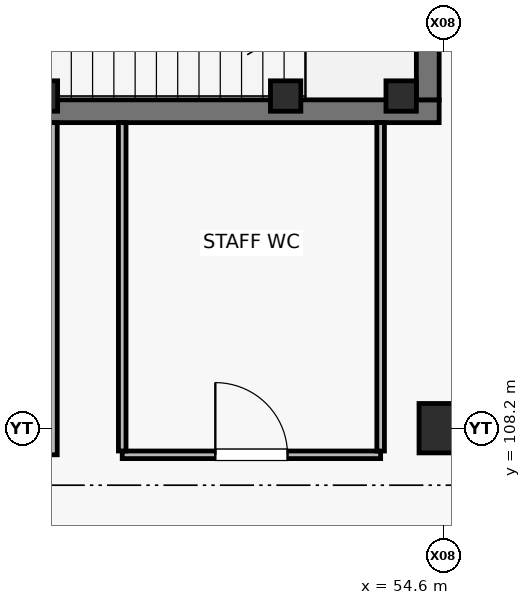
"""IFC4 building model, lengths in metres.
Left out: names, types, materials, properties, quantities, classifications, styles, units other than length and angle.
Written with IfcOpenShell. Run it as: python <this file> out.ifc"""

import sys

from ifc_helpers import new_model, si_unit, direction, frame, frame_2d, origin, origin_2d, place, context, subcontext, project, spatial, rectangle, extrude, element, fill, save


model = new_model("IFC4")
c1 = context("Model", 3, precision=1e-05, world=origin(), true_north=direction((0.0, 1.0)))
c2 = subcontext(c1, "Body", "Model", "MODEL_VIEW")
j1 = project(units=[si_unit("LENGTHUNIT", "METRE"), si_unit("PLANEANGLEUNIT", "RADIAN")], contexts=[c1])
p1 = place(None, origin())
s1 = spatial("IfcSite", under=j1, at=p1, CompositionType="ELEMENT")
p2 = place(p1, origin())
s2 = spatial("IfcBuilding", under=s1, at=p2, CompositionType="ELEMENT")
p3 = place(p2, origin())
s3 = spatial("IfcBuildingStorey", under=s2, at=p3, CompositionType="ELEMENT", Elevation=0.0)
p4 = place(p3, frame((54.6, 108.2, 0.0), z_axis=(0.0, 0.0, 1.0), x_axis=(1.0, 0.0, 0.0)))
e1 = element("IfcColumn", 1, at=p4, inside=s3, PredefinedType="COLUMN", context=c2, shape_type="SweptSolid", body=[
    extrude(rectangle(XDim=0.65, YDim=0.65, at=origin_2d()), origin(), (0.0, 0.0, 1.0), 4.8),
])
for number, where, z_axis, x_axis in (
    (2, (49.32, 112.57, 0.0), (0.0, 0.0, 1.0), (1.0, 0.0, 0.0)),
    (3, (52.52, 112.57, 0.0), (0.0, 0.0, 1.0), (1.0, 0.0, 0.0)),
    (4, (54.04, 112.57, 0.0), (0.0, 0.0, 1.0), (1.0, 0.0, 0.0)),
):
    element("IfcColumn", number, at=place(p3, frame(where, z_axis=z_axis, x_axis=x_axis)), inside=s3, PredefinedType="COLUMN", context=c2, shape_type="SweptSolid", body=[
        extrude(rectangle(XDim=0.4, YDim=0.4, at=origin_2d()), origin(), (0.0, 0.0, 1.0), 4.8),
    ])
p5 = place(p3, frame((46.95, 112.37, 0.0), z_axis=(0.0, 0.0, 1.0), x_axis=(1.0, 0.0, 0.0)))
e5 = element("IfcWall", 5, at=p5, inside=s3, PredefinedType="SHEAR", context=c2, shape_type="SweptSolid", body=[
    extrude(rectangle(XDim=7.59, YDim=0.3, at=frame_2d((3.795, 0.0))), origin(), (0.0, 0.0, 1.0), 4.54),
])
p6 = place(p5, frame((0.59, 0.0, 0.0)))
e6 = element("IfcOpeningElement", 6, at=p6, cuts=e5, PredefinedType="OPENING", context=c2, shape_type="SweptSolid", body=[
    extrude(rectangle(XDim=1.4, YDim=2.2, at=frame_2d((0.7, 1.1))), frame((0.0, 0.16, 0.0), z_axis=(0.0, -1.0, 0.0), x_axis=(1.0, 0.0, 0.0)), (0.0, 0.0, 1.0), 0.32),
])
p7 = place(p3, frame((54.39, 112.52, 0.0), z_axis=(0.0, 0.0, 1.0), x_axis=(0.0, 1.0, 0.0)))
e7 = element("IfcWall", 7, at=p7, inside=s3, PredefinedType="SHEAR", context=c2, shape_type="SweptSolid", body=[
    extrude(rectangle(XDim=3.33, YDim=0.3, at=frame_2d((1.665, 0.0))), origin(), (0.0, 0.0, 1.0), 4.54),
])
p8 = place(p3, frame((49.44, 107.85, 0.0), z_axis=(0.0, 0.0, 1.0), x_axis=(0.0, 1.0, 0.0)))
e8 = element("IfcWall", 8, at=p8, inside=s3, PredefinedType="PARTITIONING", context=c2, shape_type="SweptSolid", body=[
    extrude(rectangle(XDim=4.37, YDim=0.15, at=frame_2d((2.185, 0.0))), origin(), (0.0, 0.0, 1.0), 4.54),
])
p9 = place(p3, frame((50.37, 107.85, 0.0), z_axis=(0.0, 0.0, 1.0), x_axis=(1.0, 0.0, 0.0)))
e9 = element("IfcWall", 9, at=p9, inside=s3, PredefinedType="PARTITIONING", context=c2, shape_type="SweptSolid", body=[
    extrude(rectangle(XDim=3.4, YDim=0.1, at=frame_2d((1.7, 0.0))), origin(), (0.0, 0.0, 1.0), 4.04),
])
p10 = place(p9, frame((1.225, 0.0, 0.0)))
e10 = element("IfcOpeningElement", 10, at=p10, cuts=e9, PredefinedType="OPENING", context=c2, shape_type="SweptSolid", body=[
    extrude(rectangle(XDim=0.95, YDim=2.1, at=frame_2d((0.475, 1.05))), frame((0.0, 0.06, 0.0), z_axis=(0.0, -1.0, 0.0), x_axis=(1.0, 0.0, 0.0)), (0.0, 0.0, 1.0), 0.12),
])
for number, where, z_axis, x_axis in (
    (11, (50.37, 107.9, 0.0), (0.0, 0.0, 1.0), (0.0, 1.0, 0.0)),
    (12, (53.77, 107.9, 0.0), (0.0, 0.0, 1.0), (0.0, 1.0, 0.0)),
):
    element("IfcWall", number, at=place(p3, frame(where, z_axis=z_axis, x_axis=x_axis)), inside=s3, PredefinedType="PARTITIONING", context=c2, shape_type="SweptSolid", body=[
        extrude(rectangle(XDim=4.32, YDim=0.1, at=frame_2d((2.16, 0.0))), origin(), (0.0, 0.0, 1.0), 4.54),
    ])
p11 = place(p10, origin())
e13 = element("IfcDoor", 13, at=p11, inside=s3, OperationType="SINGLE_SWING_LEFT", PredefinedType="DOOR", context=c2, shape_type="SweptSolid", body=[
    extrude(rectangle(XDim=0.95, YDim=2.1, at=frame_2d((0.475, 1.05))), frame((0.0, 0.025, 0.0), z_axis=(0.0, -1.0, 0.0), x_axis=(1.0, 0.0, 0.0)), (0.0, 0.0, 1.0), 0.05),
])
fill(e10, e13)
save(model, sys.argv[1])
